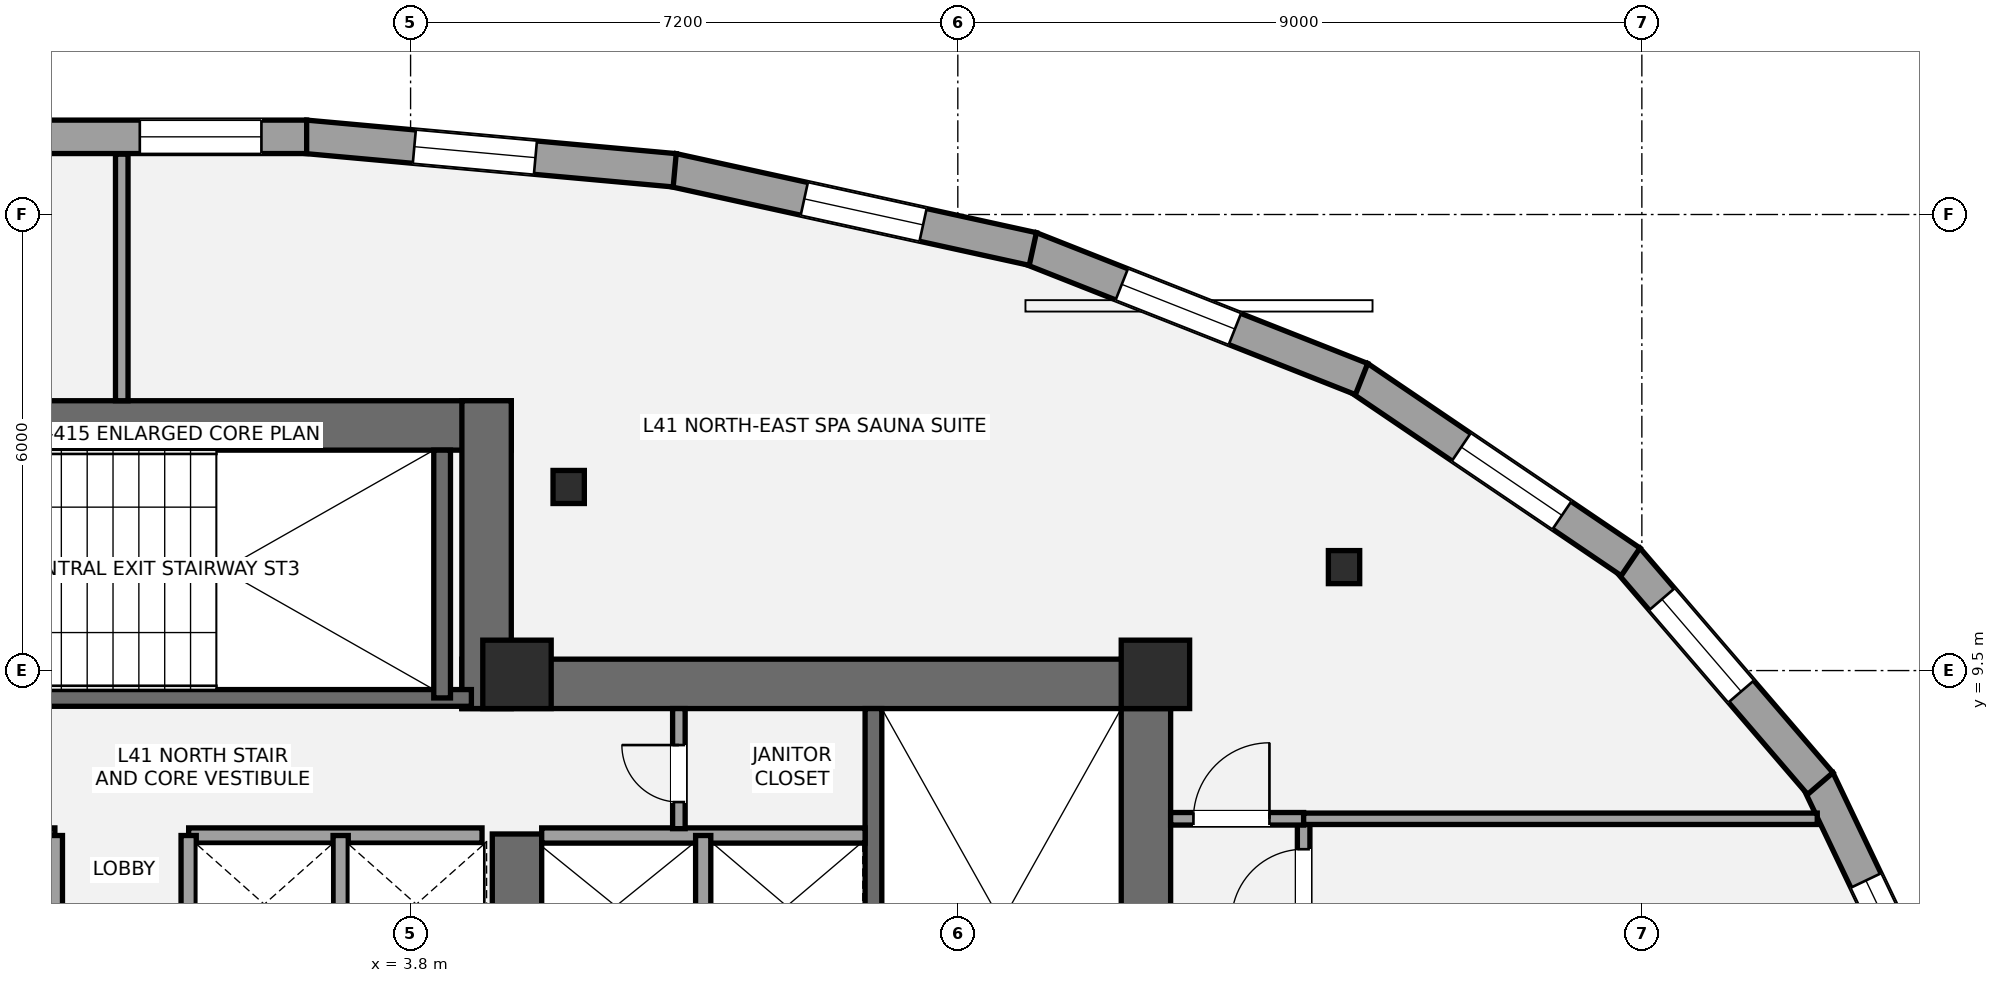
"""IFC4 building model, lengths in metres.
Left out: names, types, materials, properties, quantities, classifications, styles, units other than length and angle.
Written with IfcOpenShell. Run it as: python <this file> out.ifc"""

import sys

from ifc_helpers import new_model, si_unit, direction, frame, frame_2d, origin, origin_2d, place, context, subcontext, project, spatial, rectangle, i_section, extrude, element, fill, save


model = new_model("IFC4")
c1 = context("Model", 3, precision=1e-05, world=origin(), true_north=direction((0.0, 1.0)))
c2 = subcontext(c1, "Body", "Model", "MODEL_VIEW")
j1 = project(units=[si_unit("LENGTHUNIT", "METRE"), si_unit("PLANEANGLEUNIT", "RADIAN")], contexts=[c1])
p1 = place(None, origin())
s1 = spatial("IfcSite", under=j1, at=p1, CompositionType="ELEMENT")
p2 = place(p1, origin())
s2 = spatial("IfcBuilding", under=s1, at=p2, CompositionType="ELEMENT")
p3 = place(p2, frame((0.0, 0.0, 153.4)))
s3 = spatial("IfcBuildingStorey", under=s2, at=p3, CompositionType="ELEMENT", Elevation=153.4)
p4 = place(p3, frame((13.475, 1.2, 0.0), z_axis=(0.0, 0.0, 1.0), x_axis=(0.0, 1.0, 0.0)))
e1 = element("IfcWall", 1, at=p4, inside=s3, PredefinedType="SHEAR", context=c2, shape_type="SweptSolid", body=[
    extrude(rectangle(XDim=8.45, YDim=0.65, at=frame_2d((4.225, 0.0))), origin(), (0.0, 0.0, 1.0), 3.2),
])
p5 = place(p3, frame((4.475, 9.325, 0.0), z_axis=(0.0, 0.0, 1.0), x_axis=(1.0, 0.0, 0.0)))
e2 = element("IfcWall", 2, at=p5, inside=s3, PredefinedType="SHEAR", context=c2, shape_type="SweptSolid", body=[
    extrude(rectangle(XDim=9.325, YDim=0.65, at=frame_2d((4.663, 0.0))), origin(), (0.0, 0.0, 1.0), 3.2),
])
p6 = place(p3, frame((5.2, 5.35, 0.0), z_axis=(0.0, 0.0, 1.0), x_axis=(0.0, 1.0, 0.0)))
e3 = element("IfcWall", 3, at=p6, inside=s3, PredefinedType="SHEAR", context=c2, shape_type="SweptSolid", body=[
    extrude(rectangle(XDim=2.0, YDim=0.65, at=frame_2d((1.0, 0.0))), origin(), (0.0, 0.0, 1.0), 3.2),
])
p7 = place(p3, frame((9.89, 1.85, 0.0), z_axis=(0.0, 0.0, 1.0), x_axis=(0.0, 1.0, 0.0)))
e4 = element("IfcWall", 4, at=p7, inside=s3, PredefinedType="SHEAR", context=c2, shape_type="SweptSolid", body=[
    extrude(rectangle(XDim=7.15, YDim=0.22, at=frame_2d((3.575, 0.0))), origin(), (0.0, 0.0, 1.0), 3.2),
])
p8 = place(p3, frame((-5.125, 12.725, 0.0), z_axis=(0.0, 0.0, 1.0), x_axis=(1.0, 0.0, 0.0)))
e5 = element("IfcWall", 5, at=p8, inside=s3, PredefinedType="SHEAR", context=c2, shape_type="SweptSolid", body=[
    extrude(rectangle(XDim=10.25, YDim=0.65, at=frame_2d((5.125, 0.0))), origin(), (0.0, 0.0, 1.0), 3.2),
])
p9 = place(p3, frame((4.8, 9.0, 0.0), z_axis=(0.0, 0.0, 1.0), x_axis=(0.0, 1.0, 0.0)))
e6 = element("IfcWall", 6, at=p9, inside=s3, PredefinedType="SHEAR", context=c2, shape_type="SweptSolid", body=[
    extrude(rectangle(XDim=4.05, YDim=0.65, at=frame_2d((2.025, 0.0))), origin(), (0.0, 0.0, 1.0), 3.2),
])
p10 = place(p3, frame((-4.7, 9.14, 0.0), z_axis=(0.0, 0.0, 1.0), x_axis=(1.0, 0.0, 0.0)))
e7 = element("IfcWall", 7, at=p10, inside=s3, PredefinedType="SHEAR", context=c2, shape_type="SweptSolid", body=[
    extrude(rectangle(XDim=9.3, YDim=0.22, at=frame_2d((4.65, 0.0))), origin(), (0.0, 0.0, 1.0), 3.2),
])
p11 = place(p10, frame((1.15, 0.0, 0.0)))
e8 = element("IfcOpeningElement", 8, at=p11, cuts=e7, PredefinedType="OPENING", context=c2, shape_type="SweptSolid", body=[
    extrude(rectangle(XDim=1.05, YDim=2.15, at=frame_2d((0.525, 1.075))), frame((0.0, 0.12, 0.0), z_axis=(0.0, -1.0, 0.0), x_axis=(1.0, 0.0, 0.0)), (0.0, 0.0, 1.0), 0.24),
])
p12 = place(p3, frame((4.215, 9.14, 0.0), z_axis=(0.0, 0.0, 1.0), x_axis=(0.0, 1.0, 0.0)))
e9 = element("IfcWall", 9, at=p12, inside=s3, PredefinedType="SHEAR", context=c2, shape_type="SweptSolid", body=[
    extrude(rectangle(XDim=3.26, YDim=0.22, at=frame_2d((1.63, 0.0))), origin(), (0.0, 0.0, 1.0), 3.2),
])
for number, where, z_axis, x_axis in (
    (10, (5.2, 9.45, 0.0), (0.0, 0.0, 1.0), (1.0, 0.0, 0.0)),
    (11, (13.6, 9.45, 0.0), (0.0, 0.0, 1.0), (1.0, 0.0, 0.0)),
):
    element("IfcColumn", number, at=place(p3, frame(where, z_axis=z_axis, x_axis=x_axis)), inside=s3, PredefinedType="COLUMN", context=c2, shape_type="SweptSolid", body=[
        extrude(rectangle(XDim=0.9, YDim=0.9, at=origin_2d()), origin(), (0.0, 0.0, 1.0), 3.2),
    ])
for number, where, z_axis, x_axis in (
    (12, (16.082, 10.861, 0.0), (0.0, 0.0, 1.0), (1.0, 0.0, 0.0)),
    (13, (5.88, 11.915, 0.0), (0.0, 0.0, 1.0), (1.0, 0.0, 0.0)),
):
    element("IfcColumn", number, at=place(p3, frame(where, z_axis=z_axis, x_axis=x_axis)), inside=s3, PredefinedType="COLUMN", context=c2, shape_type="SweptSolid", body=[
        extrude(i_section(OverallWidth=0.412, OverallDepth=0.435, WebThickness=0.036, FlangeThickness=0.057, at=origin_2d()), origin(), (0.0, 0.0, 1.0), 3.2),
    ])
p13 = place(p3, frame((22.316, 8.062, 0.0), z_axis=(0.0, 0.0, 1.0), x_axis=(0.430899691529, -0.902399831472, 0.0)))
e14 = element("IfcWall", 14, at=p13, inside=s3, PredefinedType="STANDARD", context=c2, shape_type="SweptSolid", body=[
    extrude(rectangle(XDim=3.56, YDim=0.44, at=frame_2d((1.78, 0.0))), origin(), (0.0, 0.0, 1.0), 2.315),
])
p14 = place(p13, frame((1.467, 0.0, 0.58)))
e15 = element("IfcOpeningElement", 15, at=p14, cuts=e14, PredefinedType="OPENING", context=c2, shape_type="SweptSolid", body=[
    extrude(rectangle(XDim=1.6, YDim=1.55, at=frame_2d((0.8, 0.775))), frame((0.0, 0.23, 0.0), z_axis=(0.0, -1.0, 0.0), x_axis=(1.0, 0.0, 0.0)), (0.0, 0.0, 1.0), 0.46),
])
p15 = place(p3, frame((19.808, 10.969, 0.0), z_axis=(0.0, 0.0, 1.0), x_axis=(0.651797156524, -0.758393345664, 0.0)))
e16 = element("IfcWall", 16, at=p15, inside=s3, PredefinedType="STANDARD", context=c2, shape_type="SweptSolid", body=[
    extrude(rectangle(XDim=3.896, YDim=0.44, at=frame_2d((1.948, 0.0))), origin(), (0.0, 0.0, 1.0), 2.315),
])
p16 = place(p15, frame((0.699, 0.0, 0.58)))
e17 = element("IfcOpeningElement", 17, at=p16, cuts=e16, PredefinedType="OPENING", context=c2, shape_type="SweptSolid", body=[
    extrude(rectangle(XDim=1.6, YDim=1.55, at=frame_2d((0.8, 0.775))), frame((0.0, 0.23, 0.0), z_axis=(0.0, -1.0, 0.0), x_axis=(1.0, 0.0, 0.0)), (0.0, 0.0, 1.0), 0.46),
])
p17 = place(p3, frame((16.27, 13.358, 0.0), z_axis=(0.0, 0.0, 1.0), x_axis=(0.827746250701, -0.561102614902, 0.0)))
e18 = element("IfcWall", 18, at=p17, inside=s3, PredefinedType="STANDARD", context=c2, shape_type="SweptSolid", body=[
    extrude(rectangle(XDim=4.327, YDim=0.44, at=frame_2d((2.164, 0.0))), origin(), (0.0, 0.0, 1.0), 2.315),
])
p18 = place(p17, frame((1.636, 0.0, 0.58)))
e19 = element("IfcOpeningElement", 19, at=p18, cuts=e18, PredefinedType="OPENING", context=c2, shape_type="SweptSolid", body=[
    extrude(rectangle(XDim=1.6, YDim=1.55, at=frame_2d((0.8, 0.775))), frame((0.0, 0.23, 0.0), z_axis=(0.0, -1.0, 0.0), x_axis=(1.0, 0.0, 0.0)), (0.0, 0.0, 1.0), 0.46),
])
p19 = place(p3, frame((11.953, 15.056, 0.0), z_axis=(0.0, 0.0, 1.0), x_axis=(0.930130872211, -0.367228213186, 0.0)))
e20 = element("IfcWall", 20, at=p19, inside=s3, PredefinedType="STANDARD", context=c2, shape_type="SweptSolid", body=[
    extrude(rectangle(XDim=4.686, YDim=0.44, at=frame_2d((2.343, 0.0))), origin(), (0.0, 0.0, 1.0), 2.315),
])
p20 = place(p19, frame((1.294, 0.0, 0.58)))
e21 = element("IfcOpeningElement", 21, at=p20, cuts=e20, PredefinedType="OPENING", context=c2, shape_type="SweptSolid", body=[
    extrude(rectangle(XDim=1.6, YDim=1.55, at=frame_2d((0.8, 0.775))), frame((0.0, 0.23, 0.0), z_axis=(0.0, -1.0, 0.0), x_axis=(1.0, 0.0, 0.0)), (0.0, 0.0, 1.0), 0.46),
])
p21 = place(p3, frame((7.248, 16.086, 0.0), z_axis=(0.0, 0.0, 1.0), x_axis=(0.976767211892, -0.214303088576, 0.0)))
e22 = element("IfcWall", 22, at=p21, inside=s3, PredefinedType="STANDARD", context=c2, shape_type="SweptSolid", body=[
    extrude(rectangle(XDim=4.852, YDim=0.44, at=frame_2d((2.426, 0.0))), origin(), (0.0, 0.0, 1.0), 2.315),
])
p22 = place(p21, frame((1.773, 0.0, 0.58)))
e23 = element("IfcOpeningElement", 23, at=p22, cuts=e22, PredefinedType="OPENING", context=c2, shape_type="SweptSolid", body=[
    extrude(rectangle(XDim=1.6, YDim=1.55, at=frame_2d((0.8, 0.775))), frame((0.0, 0.23, 0.0), z_axis=(0.0, -1.0, 0.0), x_axis=(1.0, 0.0, 0.0)), (0.0, 0.0, 1.0), 0.46),
])
p23 = place(p3, frame((2.413, 16.523, 0.0), z_axis=(0.0, 0.0, 1.0), x_axis=(0.995913675095, -0.090310308155, 0.0)))
e24 = element("IfcWall", 24, at=p23, inside=s3, PredefinedType="STANDARD", context=c2, shape_type="SweptSolid", body=[
    extrude(rectangle(XDim=4.882, YDim=0.44, at=frame_2d((2.441, 0.0))), origin(), (0.0, 0.0, 1.0), 2.315),
])
p24 = place(p23, frame((1.442, 0.0, 0.58)))
e25 = element("IfcOpeningElement", 25, at=p24, cuts=e24, PredefinedType="OPENING", context=c2, shape_type="SweptSolid", body=[
    extrude(rectangle(XDim=1.6, YDim=1.55, at=frame_2d((0.8, 0.775))), frame((0.0, 0.23, 0.0), z_axis=(0.0, -1.0, 0.0), x_axis=(1.0, 0.0, 0.0)), (0.0, 0.0, 1.0), 0.46),
])
p25 = place(p3, frame((-2.433, 16.522, 0.0), z_axis=(0.0, 0.0, 1.0), x_axis=(1.0, 0.0, 0.0)))
e26 = element("IfcWall", 26, at=p25, inside=s3, PredefinedType="STANDARD", context=c2, shape_type="SweptSolid", body=[
    extrude(rectangle(XDim=4.865, YDim=0.44, at=frame_2d((2.433, 0.0))), origin(), (0.0, 0.0, 1.0), 2.315),
])
p26 = place(p25, frame((2.67, 0.0, 0.58)))
e27 = element("IfcOpeningElement", 27, at=p26, cuts=e26, PredefinedType="OPENING", context=c2, shape_type="SweptSolid", body=[
    extrude(rectangle(XDim=1.6, YDim=1.55, at=frame_2d((0.8, 0.775))), frame((0.0, 0.23, 0.0), z_axis=(0.0, -1.0, 0.0), x_axis=(1.0, 0.0, 0.0)), (0.0, 0.0, 1.0), 0.46),
])
p27 = place(p3, frame((5.525, 7.33, 0.0), z_axis=(0.0, 0.0, 1.0), x_axis=(1.0, 0.0, 0.0)))
e28 = element("IfcWall", 28, at=p27, inside=s3, PredefinedType="SOLIDWALL", context=c2, shape_type="SweptSolid", body=[
    extrude(rectangle(XDim=4.255, YDim=0.2, at=frame_2d((2.127, 0.0))), origin(), (0.0, 0.0, 1.0), 3.02),
])
p28 = place(p3, frame((7.65, 5.47, 0.0), z_axis=(0.0, 0.0, 1.0), x_axis=(0.0, 1.0, 0.0)))
e29 = element("IfcWall", 29, at=p28, inside=s3, PredefinedType="SOLIDWALL", context=c2, shape_type="SweptSolid", body=[
    extrude(rectangle(XDim=1.86, YDim=0.2, at=frame_2d((0.93, 0.0))), origin(), (0.0, 0.0, 1.0), 3.02),
])
for number, where, z_axis, x_axis in (
    (30, (-4.74, 7.33, 0.0), (0.0, 0.0, 1.0), (1.0, 0.0, 0.0)),
    (31, (0.88, 7.33, 0.0), (0.0, 0.0, 1.0), (1.0, 0.0, 0.0)),
):
    element("IfcWall", number, at=place(p3, frame(where, z_axis=z_axis, x_axis=x_axis)), inside=s3, PredefinedType="SOLIDWALL", context=c2, shape_type="SweptSolid", body=[
        extrude(rectangle(XDim=3.86, YDim=0.2, at=frame_2d((1.93, 0.0))), origin(), (0.0, 0.0, 1.0), 3.02),
    ])
p29 = place(p3, frame((2.88, 5.52, 0.0), z_axis=(0.0, 0.0, 1.0), x_axis=(0.0, 1.0, 0.0)))
e32 = element("IfcWall", 32, at=p29, inside=s3, PredefinedType="SOLIDWALL", context=c2, shape_type="SweptSolid", body=[
    extrude(rectangle(XDim=1.81, YDim=0.2, at=frame_2d((0.905, 0.0))), origin(), (0.0, 0.0, 1.0), 3.02),
])
p30 = place(p3, frame((-0.88, 5.52, 0.0), z_axis=(0.0, 0.0, 1.0), x_axis=(0.0, 1.0, 0.0)))
e33 = element("IfcWall", 33, at=p30, inside=s3, PredefinedType="SOLIDWALL", context=c2, shape_type="SweptSolid", body=[
    extrude(rectangle(XDim=1.81, YDim=0.2, at=frame_2d((0.905, 0.0))), origin(), (0.0, 0.0, 1.0), 2.473),
])
p31 = place(p3, frame((0.88, 5.52, 0.0), z_axis=(0.0, 0.0, 1.0), x_axis=(0.0, 1.0, 0.0)))
e34 = element("IfcWall", 34, at=p31, inside=s3, PredefinedType="SOLIDWALL", context=c2, shape_type="SweptSolid", body=[
    extrude(rectangle(XDim=1.81, YDim=0.2, at=frame_2d((0.905, 0.0))), origin(), (0.0, 0.0, 1.0), 3.02),
])
p32 = place(p3, frame((7.33, 7.42, 0.0), z_axis=(0.0, 0.0, 1.0), x_axis=(0.0, 1.0, 0.0)))
e35 = element("IfcWall", 35, at=p32, inside=s3, PredefinedType="PARTITIONING", context=c2, shape_type="SweptSolid", body=[
    extrude(rectangle(XDim=1.58, YDim=0.165, at=frame_2d((0.79, 0.0))), origin(), (0.0, 0.0, 1.0), 3.02),
])
p33 = place(p32, frame((0.35, 0.0, 0.0)))
e36 = element("IfcOpeningElement", 36, at=p33, cuts=e35, PredefinedType="OPENING", context=c2, shape_type="SweptSolid", body=[
    extrude(rectangle(XDim=0.75, YDim=2.1, at=frame_2d((0.375, 1.05))), frame((0.0, 0.093, 0.0), z_axis=(0.0, -1.0, 0.0), x_axis=(1.0, 0.0, 0.0)), (0.0, 0.0, 1.0), 0.185),
])
p34 = place(p3, frame((15.55, -13.391, 0.0), z_axis=(0.0, 0.0, 1.0), x_axis=(0.0, 1.0, 0.0)))
e37 = element("IfcWall", 37, at=p34, inside=s3, PredefinedType="PARTITIONING", context=c2, shape_type="SweptSolid", body=[
    extrude(rectangle(XDim=20.941, YDim=0.165, at=frame_2d((10.471, 0.0))), origin(), (0.0, 0.0, 1.0), 2.473),
])
p35 = place(p34, frame((5.841, 0.0, 0.0)))
e38 = element("IfcOpeningElement", 38, at=p35, cuts=e37, PredefinedType="OPENING", context=c2, shape_type="SweptSolid", body=[
    extrude(rectangle(XDim=0.85, YDim=2.1, at=frame_2d((0.425, 1.05))), frame((0.0, 0.093, 0.0), z_axis=(0.0, -1.0, 0.0), x_axis=(1.0, 0.0, 0.0)), (0.0, 0.0, 1.0), 0.185),
])
p36 = place(p34, frame((13.841, 0.0, 0.0)))
e39 = element("IfcOpeningElement", 39, at=p36, cuts=e37, PredefinedType="OPENING", context=c2, shape_type="SweptSolid", body=[
    extrude(rectangle(XDim=0.95, YDim=2.15, at=frame_2d((0.475, 1.075))), frame((0.0, 0.093, 0.0), z_axis=(0.0, -1.0, 0.0), x_axis=(1.0, 0.0, 0.0)), (0.0, 0.0, 1.0), 0.185),
])
p37 = place(p34, frame((19.591, 0.0, 0.0)))
e40 = element("IfcOpeningElement", 40, at=p37, cuts=e37, PredefinedType="OPENING", context=c2, shape_type="SweptSolid", body=[
    extrude(rectangle(XDim=0.95, YDim=2.15, at=frame_2d((0.475, 1.075))), frame((0.0, 0.093, 0.0), z_axis=(0.0, -1.0, 0.0), x_axis=(1.0, 0.0, 0.0)), (0.0, 0.0, 1.0), 0.185),
])
p38 = place(p3, frame((13.8, 7.55, 0.0), z_axis=(0.0, 0.0, 1.0), x_axis=(1.0, 0.0, 0.0)))
e41 = element("IfcWall", 41, at=p38, inside=s3, PredefinedType="PARTITIONING", context=c2, shape_type="SweptSolid", body=[
    extrude(rectangle(XDim=1.75, YDim=0.165, at=frame_2d((0.875, 0.0))), origin(), (0.0, 0.0, 1.0), 3.02),
])
p39 = place(p38, frame((0.3, 0.0, 0.0)))
e42 = element("IfcOpeningElement", 42, at=p39, cuts=e41, PredefinedType="OPENING", context=c2, shape_type="SweptSolid", body=[
    extrude(rectangle(XDim=1.0, YDim=2.15, at=frame_2d((0.5, 1.075))), frame((0.0, 0.093, 0.0), z_axis=(0.0, -1.0, 0.0), x_axis=(1.0, 0.0, 0.0)), (0.0, 0.0, 1.0), 0.185),
])
p40 = place(p3, frame((15.55, 7.55, 0.0), z_axis=(0.0, 0.0, 1.0), x_axis=(1.0, 0.0, 0.0)))
e43 = element("IfcWall", 43, at=p40, inside=s3, PredefinedType="PLUMBINGWALL", context=c2, shape_type="SweptSolid", body=[
    extrude(rectangle(XDim=6.758, YDim=0.15, at=frame_2d((3.379, 0.0))), origin(), (0.0, 0.0, 1.0), 2.473),
])
p41 = place(p3, frame((0.0, 13.05, 0.0), z_axis=(0.0, 0.0, 1.0), x_axis=(0.0, 1.0, 0.0)))
e44 = element("IfcWall", 44, at=p41, inside=s3, PredefinedType="PARTITIONING", context=c2, shape_type="SweptSolid", body=[
    extrude(rectangle(XDim=3.244, YDim=0.165, at=frame_2d((1.622, 0.0))), origin(), (0.0, 0.0, 1.0), 3.02),
])
p42 = place(p14, origin())
e45 = element("IfcWindow", 45, at=p42, inside=s3, PartitioningType="SINGLE_PANEL", PredefinedType="WINDOW", context=c2, shape_type="SweptSolid", body=[
    extrude(rectangle(XDim=1.6, YDim=1.55, at=frame_2d((0.8, 0.775))), frame((0.0, -0.01, 0.0), z_axis=(0.0, -1.0, 0.0), x_axis=(1.0, 0.0, 0.0)), (0.0, 0.0, 1.0), 0.06),
])
fill(e15, e45)
p43 = place(p16, origin())
e46 = element("IfcWindow", 46, at=p43, inside=s3, PartitioningType="SINGLE_PANEL", PredefinedType="WINDOW", context=c2, shape_type="SweptSolid", body=[
    extrude(rectangle(XDim=1.6, YDim=1.55, at=frame_2d((0.8, 0.775))), frame((0.0, -0.01, 0.0), z_axis=(0.0, -1.0, 0.0), x_axis=(1.0, 0.0, 0.0)), (0.0, 0.0, 1.0), 0.06),
])
fill(e17, e46)
p44 = place(p18, origin())
e47 = element("IfcWindow", 47, at=p44, inside=s3, PartitioningType="SINGLE_PANEL", PredefinedType="WINDOW", context=c2, shape_type="SweptSolid", body=[
    extrude(rectangle(XDim=1.6, YDim=1.55, at=frame_2d((0.8, 0.775))), frame((0.0, -0.01, 0.0), z_axis=(0.0, -1.0, 0.0), x_axis=(1.0, 0.0, 0.0)), (0.0, 0.0, 1.0), 0.06),
])
fill(e19, e47)
p45 = place(p20, origin())
e48 = element("IfcWindow", 48, at=p45, inside=s3, PartitioningType="SINGLE_PANEL", PredefinedType="WINDOW", context=c2, shape_type="SweptSolid", body=[
    extrude(rectangle(XDim=1.6, YDim=1.55, at=frame_2d((0.8, 0.775))), frame((0.0, -0.01, 0.0), z_axis=(0.0, -1.0, 0.0), x_axis=(1.0, 0.0, 0.0)), (0.0, 0.0, 1.0), 0.06),
])
fill(e21, e48)
p46 = place(p22, origin())
e49 = element("IfcWindow", 49, at=p46, inside=s3, PartitioningType="SINGLE_PANEL", PredefinedType="WINDOW", context=c2, shape_type="SweptSolid", body=[
    extrude(rectangle(XDim=1.6, YDim=1.55, at=frame_2d((0.8, 0.775))), frame((0.0, -0.01, 0.0), z_axis=(0.0, -1.0, 0.0), x_axis=(1.0, 0.0, 0.0)), (0.0, 0.0, 1.0), 0.06),
])
fill(e23, e49)
p47 = place(p24, origin())
e50 = element("IfcWindow", 50, at=p47, inside=s3, PartitioningType="SINGLE_PANEL", PredefinedType="WINDOW", context=c2, shape_type="SweptSolid", body=[
    extrude(rectangle(XDim=1.6, YDim=1.55, at=frame_2d((0.8, 0.775))), frame((0.0, -0.01, 0.0), z_axis=(0.0, -1.0, 0.0), x_axis=(1.0, 0.0, 0.0)), (0.0, 0.0, 1.0), 0.06),
])
fill(e25, e50)
p48 = place(p26, origin())
e51 = element("IfcWindow", 51, at=p48, inside=s3, PartitioningType="SINGLE_PANEL", PredefinedType="WINDOW", context=c2, shape_type="SweptSolid", body=[
    extrude(rectangle(XDim=1.6, YDim=1.55, at=frame_2d((0.8, 0.775))), frame((0.0, -0.01, 0.0), z_axis=(0.0, -1.0, 0.0), x_axis=(1.0, 0.0, 0.0)), (0.0, 0.0, 1.0), 0.06),
])
fill(e27, e51)
p49 = place(p33, origin())
e52 = element("IfcDoor", 52, at=p49, inside=s3, OperationType="SINGLE_SWING_RIGHT", PredefinedType="DOOR", context=c2, shape_type="SweptSolid", body=[
    extrude(rectangle(XDim=0.75, YDim=2.1, at=frame_2d((0.375, 1.05))), frame((0.0, 0.025, 0.0), z_axis=(0.0, -1.0, 0.0), x_axis=(1.0, 0.0, 0.0)), (0.0, 0.0, 1.0), 0.05),
])
fill(e36, e52)
p50 = place(p39, origin())
e53 = element("IfcDoor", 53, at=p50, inside=s3, OperationType="SINGLE_SWING_RIGHT", PredefinedType="DOOR", context=c2, shape_type="SweptSolid", body=[
    extrude(rectangle(XDim=1.0, YDim=2.15, at=frame_2d((0.5, 1.075))), frame((0.0, 0.025, 0.0), z_axis=(0.0, -1.0, 0.0), x_axis=(1.0, 0.0, 0.0)), (0.0, 0.0, 1.0), 0.05),
])
fill(e42, e53)
p51 = place(p37, origin())
e54 = element("IfcDoor", 54, at=p51, inside=s3, OperationType="SINGLE_SWING_LEFT", PredefinedType="DOOR", context=c2, shape_type="SweptSolid", body=[
    extrude(rectangle(XDim=0.95, YDim=2.15, at=frame_2d((0.475, 1.075))), frame((0.0, 0.025, 0.0), z_axis=(0.0, -1.0, 0.0), x_axis=(1.0, 0.0, 0.0)), (0.0, 0.0, 1.0), 0.05),
])
fill(e40, e54)
save(model, sys.argv[1])
